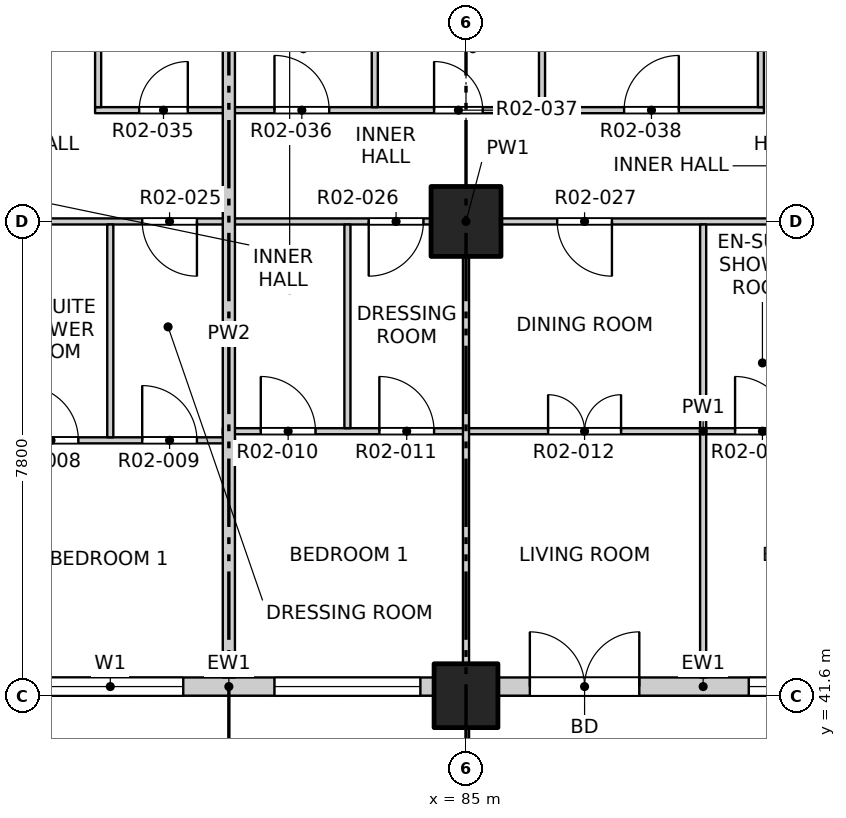
"""IFC4 building model, lengths in metres.
Left out: names, types, materials, properties, quantities, classifications, styles, units other than length and angle.
Written with IfcOpenShell. Run it as: python <this file> out.ifc"""

import sys

from ifc_helpers import new_model, si_unit, direction, frame, frame_2d, origin, origin_2d, place, context, subcontext, project, spatial, rectangle, extrude, element, fill, save


model = new_model("IFC4")
c1 = context("Model", 3, precision=1e-05, world=origin(), true_north=direction((0.0, 1.0)))
c2 = subcontext(c1, "Body", "Model", "MODEL_VIEW")
j1 = project(units=[si_unit("LENGTHUNIT", "METRE"), si_unit("PLANEANGLEUNIT", "RADIAN")], contexts=[c1])
p1 = place(None, origin())
s1 = spatial("IfcSite", under=j1, at=p1, CompositionType="ELEMENT")
p2 = place(p1, origin())
s2 = spatial("IfcBuilding", under=s1, at=p2, CompositionType="ELEMENT")
p3 = place(p2, frame((0.0, 0.0, 36.5)))
s3 = spatial("IfcBuildingStorey", under=s2, at=p3, CompositionType="ELEMENT", Elevation=36.5)
p4 = place(p3, frame((85.0, 41.6, -0.25), z_axis=(0.0, 0.0, 1.0), x_axis=(1.0, 0.0, 0.0)))
e1 = element("IfcColumn", 1, at=p4, inside=s3, PredefinedType="COLUMN", context=c2, shape_type="SweptSolid", body=[
    extrude(rectangle(XDim=1.05, YDim=1.05, at=origin_2d()), origin(), (0.0, 0.0, 1.0), 3.4),
])
p5 = place(p3, frame((85.0, 49.4, -0.25), z_axis=(0.0, 0.0, 1.0), x_axis=(1.0, 0.0, 0.0)))
e2 = element("IfcColumn", 2, at=p5, inside=s3, PredefinedType="COLUMN", context=c2, shape_type="SweptSolid", body=[
    extrude(rectangle(XDim=1.15, YDim=1.15, at=origin_2d()), origin(), (0.0, 0.0, 1.0), 3.4),
])
p6 = place(p3, frame((77.725, 41.75, 0.0), z_axis=(0.0, 0.0, 1.0), x_axis=(1.0, 0.0, 0.0)))
e3 = element("IfcWall", 3, at=p6, inside=s3, PredefinedType="SOLIDWALL", context=c2, shape_type="SweptSolid", body=[
    extrude(rectangle(XDim=6.75, YDim=0.3, at=frame_2d((3.375, 0.0))), origin(), (0.0, 0.0, 1.0), 2.7),
])
p7 = place(p6, frame((0.225, 0.0, 0.9)))
e4 = element("IfcOpeningElement", 4, at=p7, cuts=e3, PredefinedType="OPENING", context=c2, shape_type="SweptSolid", body=[
    extrude(rectangle(XDim=2.4, YDim=1.8, at=frame_2d((1.2, 0.9))), frame((0.0, 0.16, 0.0), z_axis=(0.0, -1.0, 0.0), x_axis=(1.0, 0.0, 0.0)), (0.0, 0.0, 1.0), 0.32),
])
p8 = place(p6, frame((4.125, 0.0, 0.9)))
e5 = element("IfcOpeningElement", 5, at=p8, cuts=e3, PredefinedType="OPENING", context=c2, shape_type="SweptSolid", body=[
    extrude(rectangle(XDim=2.4, YDim=1.8, at=frame_2d((1.2, 0.9))), frame((0.0, 0.16, 0.0), z_axis=(0.0, -1.0, 0.0), x_axis=(1.0, 0.0, 0.0)), (0.0, 0.0, 1.0), 0.32),
])
p9 = place(p3, frame((85.525, 41.75, 0.0), z_axis=(0.0, 0.0, 1.0), x_axis=(1.0, 0.0, 0.0)))
e6 = element("IfcWall", 6, at=p9, inside=s3, PredefinedType="SOLIDWALL", context=c2, shape_type="SweptSolid", body=[
    extrude(rectangle(XDim=6.75, YDim=0.3, at=frame_2d((3.375, 0.0))), origin(), (0.0, 0.0, 1.0), 2.7),
])
p10 = place(p9, frame((0.525, 0.0, 0.0)))
e7 = element("IfcOpeningElement", 7, at=p10, cuts=e6, PredefinedType="OPENING", context=c2, shape_type="SweptSolid", body=[
    extrude(rectangle(XDim=1.8, YDim=2.4, at=frame_2d((0.9, 1.2))), frame((0.0, 0.16, 0.0), z_axis=(0.0, -1.0, 0.0), x_axis=(1.0, 0.0, 0.0)), (0.0, 0.0, 1.0), 0.32),
])
p11 = place(p9, frame((4.125, 0.0, 0.9)))
e8 = element("IfcOpeningElement", 8, at=p11, cuts=e6, PredefinedType="OPENING", context=c2, shape_type="SweptSolid", body=[
    extrude(rectangle(XDim=2.4, YDim=1.8, at=frame_2d((1.2, 0.9))), frame((0.0, 0.16, 0.0), z_axis=(0.0, -1.0, 0.0), x_axis=(1.0, 0.0, 0.0)), (0.0, 0.0, 1.0), 0.32),
])
p12 = place(p3, frame((73.2, 45.8, 0.0), z_axis=(0.0, 0.0, 1.0), x_axis=(1.0, 0.0, 0.0)))
e9 = element("IfcWall", 9, at=p12, inside=s3, PredefinedType="PARTITIONING", context=c2, shape_type="SweptSolid", body=[
    extrude(rectangle(XDim=8.0, YDim=0.1, at=frame_2d((4.0, 0.0))), origin(), (0.0, 0.0, 1.0), 3.15),
])
p13 = place(p12, frame((1.45, 0.0, 0.0)))
e10 = element("IfcOpeningElement", 10, at=p13, cuts=e9, PredefinedType="OPENING", context=c2, shape_type="SweptSolid", body=[
    extrude(rectangle(XDim=1.2, YDim=2.1, at=frame_2d((0.6, 1.05))), frame((0.0, 0.06, 0.0), z_axis=(0.0, -1.0, 0.0), x_axis=(1.0, 0.0, 0.0)), (0.0, 0.0, 1.0), 0.12),
])
p14 = place(p12, frame((4.525, 0.0, 0.0)))
e11 = element("IfcOpeningElement", 11, at=p14, cuts=e9, PredefinedType="OPENING", context=c2, shape_type="SweptSolid", body=[
    extrude(rectangle(XDim=0.9, YDim=2.1, at=frame_2d((0.45, 1.05))), frame((0.0, 0.06, 0.0), z_axis=(0.0, -1.0, 0.0), x_axis=(1.0, 0.0, 0.0)), (0.0, 0.0, 1.0), 0.12),
])
p15 = place(p12, frame((6.475, 0.0, 0.0)))
e12 = element("IfcOpeningElement", 12, at=p15, cuts=e9, PredefinedType="OPENING", context=c2, shape_type="SweptSolid", body=[
    extrude(rectangle(XDim=0.9, YDim=2.1, at=frame_2d((0.45, 1.05))), frame((0.0, 0.06, 0.0), z_axis=(0.0, -1.0, 0.0), x_axis=(1.0, 0.0, 0.0)), (0.0, 0.0, 1.0), 0.12),
])
p16 = place(p3, frame((81.0, 45.95, 0.0), z_axis=(0.0, 0.0, 1.0), x_axis=(1.0, 0.0, 0.0)))
e13 = element("IfcWall", 13, at=p16, inside=s3, PredefinedType="PARTITIONING", context=c2, shape_type="SweptSolid", body=[
    extrude(rectangle(XDim=15.8, YDim=0.1, at=frame_2d((7.9, 0.0))), origin(), (0.0, 0.0, 1.0), 3.15),
])
p17 = place(p16, frame((0.625, 0.0, 0.0)))
e14 = element("IfcOpeningElement", 14, at=p17, cuts=e13, PredefinedType="OPENING", context=c2, shape_type="SweptSolid", body=[
    extrude(rectangle(XDim=0.9, YDim=2.1, at=frame_2d((0.45, 1.05))), frame((0.0, 0.06, 0.0), z_axis=(0.0, -1.0, 0.0), x_axis=(1.0, 0.0, 0.0)), (0.0, 0.0, 1.0), 0.12),
])
p18 = place(p16, frame((2.575, 0.0, 0.0)))
e15 = element("IfcOpeningElement", 15, at=p18, cuts=e13, PredefinedType="OPENING", context=c2, shape_type="SweptSolid", body=[
    extrude(rectangle(XDim=0.9, YDim=2.1, at=frame_2d((0.45, 1.05))), frame((0.0, 0.06, 0.0), z_axis=(0.0, -1.0, 0.0), x_axis=(1.0, 0.0, 0.0)), (0.0, 0.0, 1.0), 0.12),
])
p19 = place(p16, frame((5.35, 0.0, 0.0)))
e16 = element("IfcOpeningElement", 16, at=p19, cuts=e13, PredefinedType="OPENING", context=c2, shape_type="SweptSolid", body=[
    extrude(rectangle(XDim=1.2, YDim=2.1, at=frame_2d((0.6, 1.05))), frame((0.0, 0.06, 0.0), z_axis=(0.0, -1.0, 0.0), x_axis=(1.0, 0.0, 0.0)), (0.0, 0.0, 1.0), 0.12),
])
p20 = place(p16, frame((8.425, 0.0, 0.0)))
e17 = element("IfcOpeningElement", 17, at=p20, cuts=e13, PredefinedType="OPENING", context=c2, shape_type="SweptSolid", body=[
    extrude(rectangle(XDim=0.9, YDim=2.1, at=frame_2d((0.45, 1.05))), frame((0.0, 0.06, 0.0), z_axis=(0.0, -1.0, 0.0), x_axis=(1.0, 0.0, 0.0)), (0.0, 0.0, 1.0), 0.12),
])
p21 = place(p16, frame((10.375, 0.0, 0.0)))
e18 = element("IfcOpeningElement", 18, at=p21, cuts=e13, PredefinedType="OPENING", context=c2, shape_type="SweptSolid", body=[
    extrude(rectangle(XDim=0.9, YDim=2.1, at=frame_2d((0.45, 1.05))), frame((0.0, 0.06, 0.0), z_axis=(0.0, -1.0, 0.0), x_axis=(1.0, 0.0, 0.0)), (0.0, 0.0, 1.0), 0.12),
])
p22 = place(p16, frame((13.15, 0.0, 0.0)))
e19 = element("IfcOpeningElement", 19, at=p22, cuts=e13, PredefinedType="OPENING", context=c2, shape_type="SweptSolid", body=[
    extrude(rectangle(XDim=1.2, YDim=2.1, at=frame_2d((0.6, 1.05))), frame((0.0, 0.06, 0.0), z_axis=(0.0, -1.0, 0.0), x_axis=(1.0, 0.0, 0.0)), (0.0, 0.0, 1.0), 0.12),
])
p23 = place(p3, frame((73.2, 49.4, 0.0), z_axis=(0.0, 0.0, 1.0), x_axis=(1.0, 0.0, 0.0)))
e20 = element("IfcWall", 20, at=p23, inside=s3, PredefinedType="PARTITIONING", context=c2, shape_type="SweptSolid", body=[
    extrude(rectangle(XDim=23.6, YDim=0.1, at=frame_2d((11.8, 0.0))), origin(), (0.0, 0.0, 1.0), 3.15),
])
p24 = place(p23, frame((1.6, 0.0, 0.0)))
e21 = element("IfcOpeningElement", 21, at=p24, cuts=e20, PredefinedType="OPENING", context=c2, shape_type="SweptSolid", body=[
    extrude(rectangle(XDim=0.9, YDim=2.1, at=frame_2d((0.45, 1.05))), frame((0.0, 0.06, 0.0), z_axis=(0.0, -1.0, 0.0), x_axis=(1.0, 0.0, 0.0)), (0.0, 0.0, 1.0), 0.12),
])
p25 = place(p23, frame((6.475, 0.0, 0.0)))
e22 = element("IfcOpeningElement", 22, at=p25, cuts=e20, PredefinedType="OPENING", context=c2, shape_type="SweptSolid", body=[
    extrude(rectangle(XDim=0.9, YDim=2.1, at=frame_2d((0.45, 1.05))), frame((0.0, 0.06, 0.0), z_axis=(0.0, -1.0, 0.0), x_axis=(1.0, 0.0, 0.0)), (0.0, 0.0, 1.0), 0.12),
])
p26 = place(p23, frame((10.2, 0.0, 0.0)))
e23 = element("IfcOpeningElement", 23, at=p26, cuts=e20, PredefinedType="OPENING", context=c2, shape_type="SweptSolid", body=[
    extrude(rectangle(XDim=0.9, YDim=2.1, at=frame_2d((0.45, 1.05))), frame((0.0, 0.06, 0.0), z_axis=(0.0, -1.0, 0.0), x_axis=(1.0, 0.0, 0.0)), (0.0, 0.0, 1.0), 0.12),
])
p27 = place(p23, frame((13.3, 0.0, 0.0)))
e24 = element("IfcOpeningElement", 24, at=p27, cuts=e20, PredefinedType="OPENING", context=c2, shape_type="SweptSolid", body=[
    extrude(rectangle(XDim=0.9, YDim=2.1, at=frame_2d((0.45, 1.05))), frame((0.0, 0.06, 0.0), z_axis=(0.0, -1.0, 0.0), x_axis=(1.0, 0.0, 0.0)), (0.0, 0.0, 1.0), 0.12),
])
p28 = place(p23, frame((18.0, 0.0, 0.0)))
e25 = element("IfcOpeningElement", 25, at=p28, cuts=e20, PredefinedType="OPENING", context=c2, shape_type="SweptSolid", body=[
    extrude(rectangle(XDim=0.9, YDim=2.1, at=frame_2d((0.45, 1.05))), frame((0.0, 0.06, 0.0), z_axis=(0.0, -1.0, 0.0), x_axis=(1.0, 0.0, 0.0)), (0.0, 0.0, 1.0), 0.12),
])
p29 = place(p23, frame((21.1, 0.0, 0.0)))
e26 = element("IfcOpeningElement", 26, at=p29, cuts=e20, PredefinedType="OPENING", context=c2, shape_type="SweptSolid", body=[
    extrude(rectangle(XDim=0.9, YDim=2.1, at=frame_2d((0.45, 1.05))), frame((0.0, 0.06, 0.0), z_axis=(0.0, -1.0, 0.0), x_axis=(1.0, 0.0, 0.0)), (0.0, 0.0, 1.0), 0.12),
])
p30 = place(p3, frame((78.9, 51.23, 0.0), z_axis=(0.0, 0.0, 1.0), x_axis=(1.0, 0.0, 0.0)))
e27 = element("IfcWall", 27, at=p30, inside=s3, PredefinedType="PARTITIONING", context=c2, shape_type="SweptSolid", body=[
    extrude(rectangle(XDim=11.0, YDim=0.1, at=frame_2d((5.5, 0.0))), origin(), (0.0, 0.0, 1.0), 3.15),
])
p31 = place(p30, frame((0.725, 0.0, 0.0)))
e28 = element("IfcOpeningElement", 28, at=p31, cuts=e27, PredefinedType="OPENING", context=c2, shape_type="SweptSolid", body=[
    extrude(rectangle(XDim=0.8, YDim=2.1, at=frame_2d((0.4, 1.05))), frame((0.0, 0.06, 0.0), z_axis=(0.0, -1.0, 0.0), x_axis=(1.0, 0.0, 0.0)), (0.0, 0.0, 1.0), 0.12),
])
p32 = place(p30, frame((2.95, 0.0, 0.0)))
e29 = element("IfcOpeningElement", 29, at=p32, cuts=e27, PredefinedType="OPENING", context=c2, shape_type="SweptSolid", body=[
    extrude(rectangle(XDim=0.9, YDim=2.1, at=frame_2d((0.45, 1.05))), frame((0.0, 0.06, 0.0), z_axis=(0.0, -1.0, 0.0), x_axis=(1.0, 0.0, 0.0)), (0.0, 0.0, 1.0), 0.12),
])
p33 = place(p30, frame((5.575, 0.0, 0.0)))
e30 = element("IfcOpeningElement", 30, at=p33, cuts=e27, PredefinedType="OPENING", context=c2, shape_type="SweptSolid", body=[
    extrude(rectangle(XDim=0.8, YDim=2.1, at=frame_2d((0.4, 1.05))), frame((0.0, 0.06, 0.0), z_axis=(0.0, -1.0, 0.0), x_axis=(1.0, 0.0, 0.0)), (0.0, 0.0, 1.0), 0.12),
])
p34 = place(p30, frame((8.7, 0.0, 0.0)))
e31 = element("IfcOpeningElement", 31, at=p34, cuts=e27, PredefinedType="OPENING", context=c2, shape_type="SweptSolid", body=[
    extrude(rectangle(XDim=0.9, YDim=2.1, at=frame_2d((0.45, 1.05))), frame((0.0, 0.06, 0.0), z_axis=(0.0, -1.0, 0.0), x_axis=(1.0, 0.0, 0.0)), (0.0, 0.0, 1.0), 0.12),
])
p35 = place(p3, frame((78.95, 51.28, 0.0), z_axis=(0.0, 0.0, 1.0), x_axis=(0.0, 1.0, 0.0)))
e32 = element("IfcWall", 32, at=p35, inside=s3, PredefinedType="PARTITIONING", context=c2, shape_type="SweptSolid", body=[
    extrude(rectangle(XDim=1.92, YDim=0.1, at=frame_2d((0.96, 0.0))), origin(), (0.0, 0.0, 1.0), 3.15),
])
p36 = place(p3, frame((79.15, 45.85, 0.0), z_axis=(0.0, 0.0, 1.0), x_axis=(0.0, 1.0, 0.0)))
e33 = element("IfcWall", 33, at=p36, inside=s3, PredefinedType="PARTITIONING", context=c2, shape_type="SweptSolid", body=[
    extrude(rectangle(XDim=3.5, YDim=0.1, at=frame_2d((1.75, 0.0))), origin(), (0.0, 0.0, 1.0), 3.15),
])
p37 = place(p3, frame((81.1, 41.9, 0.0), z_axis=(0.0, 0.0, 1.0), x_axis=(0.0, 1.0, 0.0)))
e34 = element("IfcWall", 34, at=p37, inside=s3, PredefinedType="PARTITIONING", context=c2, shape_type="SweptSolid", body=[
    extrude(rectangle(XDim=11.3, YDim=0.2, at=frame_2d((5.65, 0.0))), origin(), (0.0, 0.0, 1.0), 3.15),
])
p38 = place(p3, frame((83.05, 46.0, 0.0), z_axis=(0.0, 0.0, 1.0), x_axis=(0.0, 1.0, 0.0)))
e35 = element("IfcWall", 35, at=p38, inside=s3, PredefinedType="PARTITIONING", context=c2, shape_type="SweptSolid", body=[
    extrude(rectangle(XDim=3.35, YDim=0.1, at=frame_2d((1.675, 0.0))), origin(), (0.0, 0.0, 1.0), 3.15),
])
p39 = place(p3, frame((83.5, 51.28, 0.0), z_axis=(0.0, 0.0, 1.0), x_axis=(0.0, 1.0, 0.0)))
e36 = element("IfcWall", 36, at=p39, inside=s3, PredefinedType="PARTITIONING", context=c2, shape_type="SweptSolid", body=[
    extrude(rectangle(XDim=1.92, YDim=0.1, at=frame_2d((0.96, 0.0))), origin(), (0.0, 0.0, 1.0), 3.15),
])
p40 = place(p3, frame((85.0, 41.9, 0.0), z_axis=(0.0, 0.0, 1.0), x_axis=(0.0, 1.0, 0.0)))
e37 = element("IfcWall", 37, at=p40, inside=s3, PredefinedType="PARTITIONING", context=c2, shape_type="SweptSolid", body=[
    extrude(rectangle(XDim=7.45, YDim=0.1, at=frame_2d((3.725, 0.0))), origin(), (0.0, 0.0, 1.0), 2.55),
])
p41 = place(p3, frame((86.25, 51.28, 0.0), z_axis=(0.0, 0.0, 1.0), x_axis=(0.0, 1.0, 0.0)))
e38 = element("IfcWall", 38, at=p41, inside=s3, PredefinedType="PARTITIONING", context=c2, shape_type="SweptSolid", body=[
    extrude(rectangle(XDim=1.92, YDim=0.1, at=frame_2d((0.96, 0.0))), origin(), (0.0, 0.0, 1.0), 3.15),
])
p42 = place(p3, frame((88.9, 41.9, 0.0), z_axis=(0.0, 0.0, 1.0), x_axis=(0.0, 1.0, 0.0)))
e39 = element("IfcWall", 39, at=p42, inside=s3, PredefinedType="PARTITIONING", context=c2, shape_type="SweptSolid", body=[
    extrude(rectangle(XDim=7.45, YDim=0.1, at=frame_2d((3.725, 0.0))), origin(), (0.0, 0.0, 1.0), 3.15),
])
p43 = place(p3, frame((89.85, 51.28, 0.0), z_axis=(0.0, 0.0, 1.0), x_axis=(0.0, 1.0, 0.0)))
e40 = element("IfcWall", 40, at=p43, inside=s3, PredefinedType="PARTITIONING", context=c2, shape_type="SweptSolid", body=[
    extrude(rectangle(XDim=1.92, YDim=0.1, at=frame_2d((0.96, 0.0))), origin(), (0.0, 0.0, 1.0), 3.15),
])
p44 = place(p7, origin())
e41 = element("IfcWindow", 41, at=p44, inside=s3, PartitioningType="DOUBLE_PANEL_VERTICAL", PredefinedType="WINDOW", context=c2, shape_type="SweptSolid", body=[
    extrude(rectangle(XDim=2.4, YDim=1.8, at=frame_2d((1.2, 0.9))), frame((0.0, 0.03, 0.0), z_axis=(0.0, -1.0, 0.0), x_axis=(1.0, 0.0, 0.0)), (0.0, 0.0, 1.0), 0.06),
])
fill(e4, e41)
p45 = place(p8, origin())
e42 = element("IfcWindow", 42, at=p45, inside=s3, PartitioningType="DOUBLE_PANEL_VERTICAL", PredefinedType="WINDOW", context=c2, shape_type="SweptSolid", body=[
    extrude(rectangle(XDim=2.4, YDim=1.8, at=frame_2d((1.2, 0.9))), frame((0.0, 0.03, 0.0), z_axis=(0.0, -1.0, 0.0), x_axis=(1.0, 0.0, 0.0)), (0.0, 0.0, 1.0), 0.06),
])
fill(e5, e42)
p46 = place(p10, origin())
e43 = element("IfcDoor", 43, at=p46, inside=s3, OperationType="DOUBLE_DOOR_SINGLE_SWING", PredefinedType="DOOR", context=c2, shape_type="SweptSolid", body=[
    extrude(rectangle(XDim=1.8, YDim=2.4, at=frame_2d((0.9, 1.2))), frame((0.0, 0.025, 0.0), z_axis=(0.0, -1.0, 0.0), x_axis=(1.0, 0.0, 0.0)), (0.0, 0.0, 1.0), 0.05),
])
fill(e7, e43)
p47 = place(p11, origin())
e44 = element("IfcWindow", 44, at=p47, inside=s3, PartitioningType="DOUBLE_PANEL_VERTICAL", PredefinedType="WINDOW", context=c2, shape_type="SweptSolid", body=[
    extrude(rectangle(XDim=2.4, YDim=1.8, at=frame_2d((1.2, 0.9))), frame((0.0, 0.03, 0.0), z_axis=(0.0, -1.0, 0.0), x_axis=(1.0, 0.0, 0.0)), (0.0, 0.0, 1.0), 0.06),
])
fill(e8, e44)
p48 = place(p14, origin())
e45 = element("IfcDoor", 45, at=p48, inside=s3, OperationType="SINGLE_SWING_LEFT", PredefinedType="DOOR", context=c2, shape_type="SweptSolid", body=[
    extrude(rectangle(XDim=0.9, YDim=2.1, at=frame_2d((0.45, 1.05))), frame((0.0, 0.025, 0.0), z_axis=(0.0, -1.0, 0.0), x_axis=(1.0, 0.0, 0.0)), (0.0, 0.0, 1.0), 0.05),
])
fill(e11, e45)
p49 = place(p15, origin())
e46 = element("IfcDoor", 46, at=p49, inside=s3, OperationType="SINGLE_SWING_LEFT", PredefinedType="DOOR", context=c2, shape_type="SweptSolid", body=[
    extrude(rectangle(XDim=0.9, YDim=2.1, at=frame_2d((0.45, 1.05))), frame((0.0, 0.025, 0.0), z_axis=(0.0, -1.0, 0.0), x_axis=(1.0, 0.0, 0.0)), (0.0, 0.0, 1.0), 0.05),
])
fill(e12, e46)
p50 = place(p17, origin())
e47 = element("IfcDoor", 47, at=p50, inside=s3, OperationType="SINGLE_SWING_LEFT", PredefinedType="DOOR", context=c2, shape_type="SweptSolid", body=[
    extrude(rectangle(XDim=0.9, YDim=2.1, at=frame_2d((0.45, 1.05))), frame((0.0, 0.025, 0.0), z_axis=(0.0, -1.0, 0.0), x_axis=(1.0, 0.0, 0.0)), (0.0, 0.0, 1.0), 0.05),
])
fill(e14, e47)
p51 = place(p18, origin())
e48 = element("IfcDoor", 48, at=p51, inside=s3, OperationType="SINGLE_SWING_LEFT", PredefinedType="DOOR", context=c2, shape_type="SweptSolid", body=[
    extrude(rectangle(XDim=0.9, YDim=2.1, at=frame_2d((0.45, 1.05))), frame((0.0, 0.025, 0.0), z_axis=(0.0, -1.0, 0.0), x_axis=(1.0, 0.0, 0.0)), (0.0, 0.0, 1.0), 0.05),
])
fill(e15, e48)
p52 = place(p19, origin())
e49 = element("IfcDoor", 49, at=p52, inside=s3, OperationType="DOUBLE_DOOR_SINGLE_SWING", PredefinedType="DOOR", context=c2, shape_type="SweptSolid", body=[
    extrude(rectangle(XDim=1.2, YDim=2.1, at=frame_2d((0.6, 1.05))), frame((0.0, 0.025, 0.0), z_axis=(0.0, -1.0, 0.0), x_axis=(1.0, 0.0, 0.0)), (0.0, 0.0, 1.0), 0.05),
])
fill(e16, e49)
p53 = place(p20, origin())
e50 = element("IfcDoor", 50, at=p53, inside=s3, OperationType="SINGLE_SWING_LEFT", PredefinedType="DOOR", context=c2, shape_type="SweptSolid", body=[
    extrude(rectangle(XDim=0.9, YDim=2.1, at=frame_2d((0.45, 1.05))), frame((0.0, 0.025, 0.0), z_axis=(0.0, -1.0, 0.0), x_axis=(1.0, 0.0, 0.0)), (0.0, 0.0, 1.0), 0.05),
])
fill(e17, e50)
p54 = place(p25, origin())
e51 = element("IfcDoor", 51, at=p54, inside=s3, OperationType="SINGLE_SWING_LEFT", PredefinedType="DOOR", context=c2, shape_type="SweptSolid", body=[
    extrude(rectangle(XDim=0.9, YDim=2.1, at=frame_2d((0.45, 1.05))), frame((0.0, 0.025, 0.0), z_axis=(0.0, -1.0, 0.0), x_axis=(1.0, 0.0, 0.0)), (0.0, 0.0, 1.0), 0.05),
])
fill(e22, e51)
p55 = place(p26, origin())
e52 = element("IfcDoor", 52, at=p55, inside=s3, OperationType="SINGLE_SWING_RIGHT", PredefinedType="DOOR", context=c2, shape_type="SweptSolid", body=[
    extrude(rectangle(XDim=0.9, YDim=2.1, at=frame_2d((0.45, 1.05))), frame((0.0, 0.025, 0.0), z_axis=(0.0, -1.0, 0.0), x_axis=(1.0, 0.0, 0.0)), (0.0, 0.0, 1.0), 0.05),
])
fill(e23, e52)
p56 = place(p27, origin())
e53 = element("IfcDoor", 53, at=p56, inside=s3, OperationType="SINGLE_SWING_LEFT", PredefinedType="DOOR", context=c2, shape_type="SweptSolid", body=[
    extrude(rectangle(XDim=0.9, YDim=2.1, at=frame_2d((0.45, 1.05))), frame((0.0, 0.025, 0.0), z_axis=(0.0, -1.0, 0.0), x_axis=(1.0, 0.0, 0.0)), (0.0, 0.0, 1.0), 0.05),
])
fill(e24, e53)
p57 = place(p31, origin())
e54 = element("IfcDoor", 54, at=p57, inside=s3, OperationType="SINGLE_SWING_RIGHT", PredefinedType="DOOR", context=c2, shape_type="SweptSolid", body=[
    extrude(rectangle(XDim=0.8, YDim=2.1, at=frame_2d((0.4, 1.05))), frame((0.0, 0.025, 0.0), z_axis=(0.0, -1.0, 0.0), x_axis=(1.0, 0.0, 0.0)), (0.0, 0.0, 1.0), 0.05),
])
fill(e28, e54)
p58 = place(p32, origin())
e55 = element("IfcDoor", 55, at=p58, inside=s3, OperationType="SINGLE_SWING_LEFT", PredefinedType="DOOR", context=c2, shape_type="SweptSolid", body=[
    extrude(rectangle(XDim=0.9, YDim=2.1, at=frame_2d((0.45, 1.05))), frame((0.0, 0.025, 0.0), z_axis=(0.0, -1.0, 0.0), x_axis=(1.0, 0.0, 0.0)), (0.0, 0.0, 1.0), 0.05),
])
fill(e29, e55)
p59 = place(p33, origin())
e56 = element("IfcDoor", 56, at=p59, inside=s3, OperationType="SINGLE_SWING_LEFT", PredefinedType="DOOR", context=c2, shape_type="SweptSolid", body=[
    extrude(rectangle(XDim=0.8, YDim=2.1, at=frame_2d((0.4, 1.05))), frame((0.0, 0.025, 0.0), z_axis=(0.0, -1.0, 0.0), x_axis=(1.0, 0.0, 0.0)), (0.0, 0.0, 1.0), 0.05),
])
fill(e30, e56)
p60 = place(p34, origin())
e57 = element("IfcDoor", 57, at=p60, inside=s3, OperationType="SINGLE_SWING_RIGHT", PredefinedType="DOOR", context=c2, shape_type="SweptSolid", body=[
    extrude(rectangle(XDim=0.9, YDim=2.1, at=frame_2d((0.45, 1.05))), frame((0.0, 0.025, 0.0), z_axis=(0.0, -1.0, 0.0), x_axis=(1.0, 0.0, 0.0)), (0.0, 0.0, 1.0), 0.05),
])
fill(e31, e57)
save(model, sys.argv[1])
